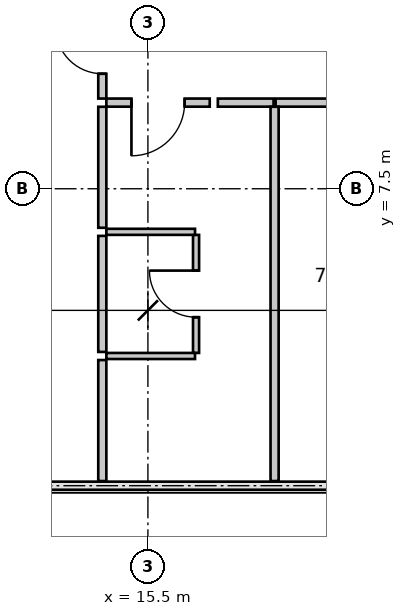
"""IFC4 building model, lengths in metres.
Left out: names, types, materials, properties, quantities, classifications, styles, units other than length and angle.
Written with IfcOpenShell. Run it as: python <this file> out.ifc"""

import sys

from ifc_helpers import new_model, si_unit, direction, frame, frame_2d, origin, place, context, subcontext, project, spatial, rectangle, extrude, source, transform, mapped, element, fill, save


model = new_model("IFC4")
c1 = context("Model", 3, precision=1e-05, world=origin(), true_north=direction((0.0, 1.0)))
c2 = subcontext(c1, "Body", "Model", "MODEL_VIEW")
j1 = project(units=[si_unit("LENGTHUNIT", "METRE"), si_unit("PLANEANGLEUNIT", "RADIAN")], contexts=[c1])
p1 = place(None, origin())
s1 = spatial("IfcSite", under=j1, at=p1, CompositionType="ELEMENT")
p2 = place(p1, origin())
s2 = spatial("IfcBuilding", under=s1, at=p2, CompositionType="ELEMENT")
p3 = place(p2, frame((0.0, 0.0, 32.55)))
s3 = spatial("IfcBuildingStorey", under=s2, at=p3, CompositionType="ELEMENT", Elevation=32.55)
m1 = source(origin(), c2, "Body", "SweptSolid", [
    extrude(rectangle(XDim=2.04, YDim=0.16, at=frame_2d((1.02, 0.0))), origin(), (0.0, 0.0, 1.0), 2.93),
])
p4 = place(p3, frame((16.72, 9.2, 0.0), z_axis=(0.0, 0.0, 1.0), x_axis=(-1.0, 0.0, 0.0)))
e1 = element("IfcWall", 1, at=p4, inside=s3, PredefinedType="PARTITIONING", context=c2, shape_type="MappedRepresentation", body=[
    mapped(m1, transform((0.0, 0.0, 0.0), scale=1.0)),
])
m2 = source(origin(), c2, "Body", "SweptSolid", [
    extrude(rectangle(XDim=1.05, YDim=2.1, at=frame_2d((0.525, 1.05))), frame((0.0, 0.09, 0.0), z_axis=(0.0, -1.0, 0.0), x_axis=(1.0, 0.0, 0.0)), (0.0, 0.0, 1.0), 0.18),
])
p5 = place(p4, frame((0.495, 0.0, 0.0)))
e2 = element("IfcOpeningElement", 2, at=p5, cuts=e1, PredefinedType="OPENING", context=c2, shape_type="MappedRepresentation", body=[
    mapped(m2, transform((0.0, 0.0, 0.0), scale=1.0)),
])
m3 = source(origin(), c2, "Body", "SweptSolid", [
    extrude(rectangle(XDim=1.9, YDim=0.16, at=frame_2d((0.95, 0.0))), origin(), (0.0, 0.0, 1.0), 2.93),
])
p6 = place(p3, frame((14.6, 9.28, 0.0), z_axis=(0.0, 0.0, 1.0), x_axis=(0.0, 1.0, 0.0)))
e3 = element("IfcWall", 3, at=p6, inside=s3, PredefinedType="PARTITIONING", context=c2, shape_type="MappedRepresentation", body=[
    mapped(m3, transform((0.0, 0.0, 0.0), scale=1.0)),
])
m4 = source(origin(), c2, "Body", "SweptSolid", [
    extrude(rectangle(XDim=0.92, YDim=2.1, at=frame_2d((0.46, 1.05))), frame((0.0, 0.09, 0.0), z_axis=(0.0, -1.0, 0.0), x_axis=(1.0, 0.0, 0.0)), (0.0, 0.0, 1.0), 0.18),
])
p7 = place(p6, frame((0.49, 0.0, 0.0)))
e4 = element("IfcOpeningElement", 4, at=p7, cuts=e3, PredefinedType="OPENING", context=c2, shape_type="MappedRepresentation", body=[
    mapped(m4, transform((0.0, 0.0, 0.0), scale=1.0)),
])
m5 = source(origin(), c2, "Body", "SweptSolid", [
    extrude(rectangle(XDim=1.1, YDim=0.16, at=frame_2d((0.55, 0.0))), origin(), (0.0, 0.0, 1.0), 2.93),
])
p8 = place(p3, frame((17.98, 9.2, 0.0), z_axis=(0.0, 0.0, 1.0), x_axis=(-1.0, 0.0, 0.0)))
e5 = element("IfcWall", 5, at=p8, inside=s3, PredefinedType="PARTITIONING", context=c2, shape_type="MappedRepresentation", body=[
    mapped(m5, transform((0.0, 0.0, 0.0), scale=1.0)),
])
m6 = source(origin(), c2, "Body", "SweptSolid", [
    extrude(rectangle(XDim=5.36, YDim=0.16, at=frame_2d((2.68, 0.0))), origin(), (0.0, 0.0, 1.0), 2.93),
])
p9 = place(p3, frame((23.38, 9.2, 0.0), z_axis=(0.0, 0.0, 1.0), x_axis=(-1.0, 0.0, 0.0)))
e6 = element("IfcWall", 6, at=p9, inside=s3, PredefinedType="PARTITIONING", context=c2, shape_type="MappedRepresentation", body=[
    mapped(m6, transform((0.0, 0.0, 0.0), scale=1.0)),
])
p10 = place(p9, frame((2.22, 0.0, 0.0)))
e7 = element("IfcOpeningElement", 7, at=p10, cuts=e6, PredefinedType="OPENING", context=c2, shape_type="MappedRepresentation", body=[
    mapped(m4, transform((0.0, 0.0, 0.0), scale=1.0)),
])
m7 = source(origin(), c2, "Body", "SweptSolid", [
    extrude(rectangle(XDim=2.33, YDim=0.12, at=frame_2d((1.165, 0.0))), origin(), (0.0, 0.0, 1.0), 2.93),
])
p11 = place(p3, frame((16.45, 4.26, 0.0), z_axis=(0.0, 0.0, 1.0), x_axis=(0.0, 1.0, 0.0)))
e8 = element("IfcWall", 8, at=p11, inside=s3, PredefinedType="PARTITIONING", context=c2, shape_type="MappedRepresentation", body=[
    mapped(m7, transform((0.0, 0.0, 0.0), scale=1.0)),
])
m8 = source(origin(), c2, "Body", "SweptSolid", [
    extrude(rectangle(XDim=0.92, YDim=2.1, at=frame_2d((0.46, 1.05))), frame((0.0, 0.07, 0.0), z_axis=(0.0, -1.0, 0.0), x_axis=(1.0, 0.0, 0.0)), (0.0, 0.0, 1.0), 0.14),
])
p12 = place(p11, frame((0.705, 0.0, 0.0)))
e9 = element("IfcOpeningElement", 9, at=p12, cuts=e8, PredefinedType="OPENING", context=c2, shape_type="MappedRepresentation", body=[
    mapped(m8, transform((0.0, 0.0, 0.0), scale=1.0)),
])
m9 = source(origin(), c2, "Body", "SweptSolid", [
    extrude(rectangle(XDim=1.75, YDim=0.12, at=frame_2d((0.875, 0.0))), origin(), (0.0, 0.0, 1.0), 2.93),
])
for number, where, z_axis, x_axis in (
    (10, (14.68, 4.2, 0.0), (0.0, 0.0, 1.0), (1.0, 0.0, 0.0)),
    (11, (16.43, 6.65, 0.0), (0.0, 0.0, 1.0), (-1.0, 0.0, 0.0)),
):
    element("IfcWall", number, at=place(p3, frame(where, z_axis=z_axis, x_axis=x_axis)), inside=s3, PredefinedType="PARTITIONING", context=c2, shape_type="MappedRepresentation", body=[
        mapped(m9, transform((0.0, 0.0, 0.0), scale=1.0)),
    ])
m10 = source(origin(), c2, "Body", "SweptSolid", [
    extrude(rectangle(XDim=7.386, YDim=0.16, at=frame_2d((3.693, 0.0))), origin(), (0.0, 0.0, 1.0), 2.93),
])
p13 = place(p3, frame((18.0, 9.118, 0.0), z_axis=(0.0, 0.0, 1.0), x_axis=(0.0, -1.0, 0.0)))
e12 = element("IfcWall", 12, at=p13, inside=s3, PredefinedType="PARTITIONING", context=c2, shape_type="MappedRepresentation", body=[
    mapped(m10, transform((0.0, 0.0, 0.0), scale=1.0)),
])
m11 = source(origin(), c2, "Body", "SweptSolid", [
    extrude(rectangle(XDim=2.388, YDim=0.16, at=frame_2d((1.194, 0.0))), origin(), (0.0, 0.0, 1.0), 2.93),
])
p14 = place(p3, frame((14.6, 1.732, 0.0), z_axis=(0.0, 0.0, 1.0), x_axis=(0.0, 1.0, 0.0)))
e13 = element("IfcWall", 13, at=p14, inside=s3, PredefinedType="PARTITIONING", context=c2, shape_type="MappedRepresentation", body=[
    mapped(m11, transform((0.0, 0.0, 0.0), scale=1.0)),
])
m12 = source(origin(), c2, "Body", "SweptSolid", [
    extrude(rectangle(XDim=2.388, YDim=0.16, at=frame_2d((1.194, 0.0))), origin(), (0.0, 0.0, 1.0), 2.93),
])
p15 = place(p3, frame((14.6, 6.73, 0.0), z_axis=(0.0, 0.0, 1.0), x_axis=(0.0, 1.0, 0.0)))
e14 = element("IfcWall", 14, at=p15, inside=s3, PredefinedType="PARTITIONING", context=c2, shape_type="MappedRepresentation", body=[
    mapped(m12, transform((0.0, 0.0, 0.0), scale=1.0)),
])
m13 = source(origin(), c2, "Body", "SweptSolid", [
    extrude(rectangle(XDim=2.29, YDim=0.16, at=frame_2d((1.145, 0.0))), origin(), (0.0, 0.0, 1.0), 2.93),
])
p16 = place(p3, frame((14.6, 4.28, 0.0), z_axis=(0.0, 0.0, 1.0), x_axis=(0.0, 1.0, 0.0)))
e15 = element("IfcWall", 15, at=p16, inside=s3, PredefinedType="PARTITIONING", context=c2, shape_type="MappedRepresentation", body=[
    mapped(m13, transform((0.0, 0.0, 0.0), scale=1.0)),
])
m14 = source(origin(), c2, "Body", "SweptSolid", [
    extrude(rectangle(XDim=1.05, YDim=2.1, at=frame_2d((0.525, 1.05))), frame((0.0, 0.025, 0.0), z_axis=(0.0, -1.0, 0.0), x_axis=(1.0, 0.0, 0.0)), (0.0, 0.0, 1.0), 0.05),
])
p17 = place(p5, origin())
e16 = element("IfcDoor", 16, at=p17, inside=s3, OperationType="SINGLE_SWING_RIGHT", PredefinedType="DOOR", context=c2, shape_type="MappedRepresentation", body=[
    mapped(m14, transform((0.0, 0.0, 0.0), scale=1.0)),
])
fill(e2, e16)
m15 = source(origin(), c2, "Body", "SweptSolid", [
    extrude(rectangle(XDim=0.92, YDim=2.1, at=frame_2d((0.46, 1.05))), frame((0.0, 0.025, 0.0), z_axis=(0.0, -1.0, 0.0), x_axis=(1.0, 0.0, 0.0)), (0.0, 0.0, 1.0), 0.05),
])
p18 = place(p7, origin())
e17 = element("IfcDoor", 17, at=p18, inside=s3, OperationType="SINGLE_SWING_RIGHT", PredefinedType="DOOR", context=c2, shape_type="MappedRepresentation", body=[
    mapped(m15, transform((0.0, 0.0, 0.0), scale=1.0)),
])
fill(e4, e17)
p19 = place(p12, origin())
e18 = element("IfcDoor", 18, at=p19, inside=s3, OperationType="SINGLE_SWING_RIGHT", PredefinedType="DOOR", context=c2, shape_type="MappedRepresentation", body=[
    mapped(m15, transform((0.0, 0.0, 0.0), scale=1.0)),
])
fill(e9, e18)
save(model, sys.argv[1])
